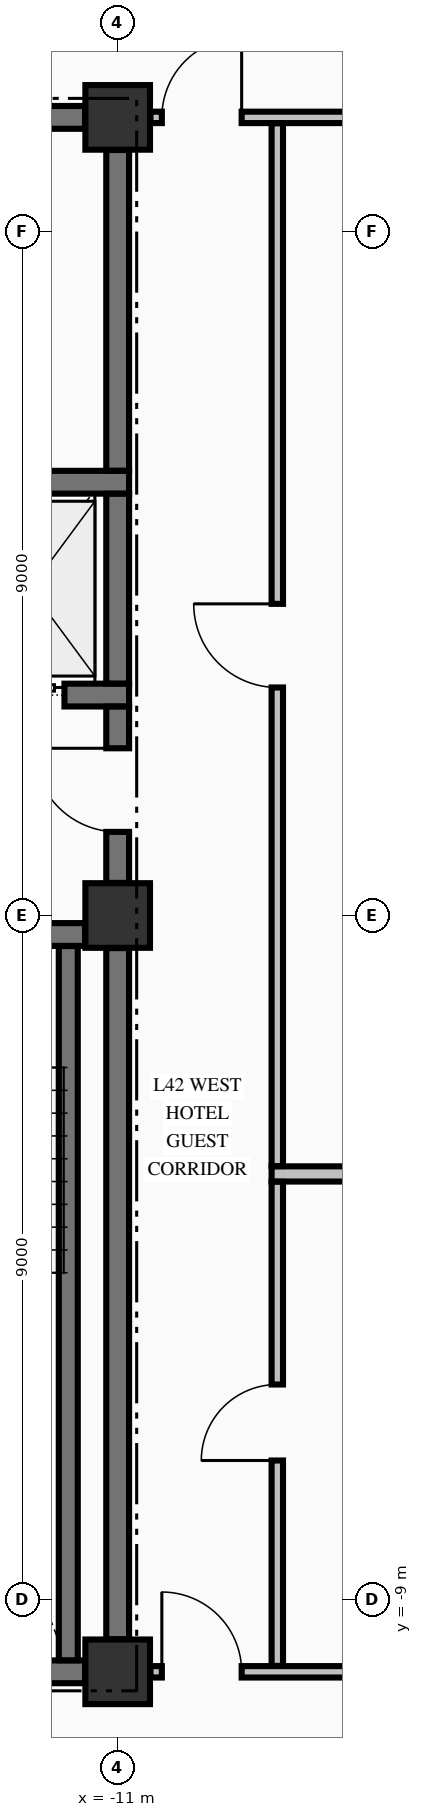
"""IFC4 building model, lengths in metres.
Left out: names, types, materials, properties, quantities, classifications, styles, units other than length and angle.
Written with IfcOpenShell. Run it as: python <this file> out.ifc"""

import sys

from ifc_helpers import new_model, si_unit, direction, frame, frame_2d, origin, origin_2d, place, context, subcontext, project, spatial, rectangle, extrude, element, fill, save


model = new_model("IFC4")
c1 = context("Model", 3, precision=1e-05, world=origin(), true_north=direction((0.0, 1.0)))
c2 = subcontext(c1, "Body", "Model", "MODEL_VIEW")
j1 = project(units=[si_unit("LENGTHUNIT", "METRE"), si_unit("PLANEANGLEUNIT", "RADIAN")], contexts=[c1])
p1 = place(None, origin())
s1 = spatial("IfcSite", under=j1, at=p1, CompositionType="ELEMENT")
p2 = place(p1, origin())
s2 = spatial("IfcBuilding", under=s1, at=p2, CompositionType="ELEMENT")
p3 = place(p2, frame((0.0, 0.0, 166.06)))
s3 = spatial("IfcBuildingStorey", under=s2, at=p3, CompositionType="ELEMENT", Elevation=166.06)
for number, where, z_axis, x_axis in (
    (1, (-11.0, -9.95, -0.25), (0.0, 0.0, 1.0), (1.0, 0.0, 0.0)),
    (2, (-11.0, 0.0, -0.25), (0.0, 0.0, 1.0), (1.0, 0.0, 0.0)),
    (3, (-11.0, 10.5, -0.25), (0.0, 0.0, 1.0), (1.0, 0.0, 0.0)),
):
    element("IfcColumn", number, at=place(p3, frame(where, z_axis=z_axis, x_axis=x_axis)), inside=s3, PredefinedType="COLUMN", context=c2, shape_type="SweptSolid", body=[
        extrude(rectangle(XDim=0.85, YDim=0.85, at=origin_2d()), origin(), (0.0, 0.0, 1.0), 3.4),
    ])
p4 = place(p3, frame((-14.7, -9.95, 0.0), z_axis=(0.0, 0.0, 1.0), x_axis=(1.0, 0.0, 0.0)))
e4 = element("IfcWall", 4, at=p4, inside=s3, PredefinedType="SHEAR", context=c2, shape_type="SweptSolid", body=[
    extrude(rectangle(XDim=3.271, YDim=0.3, at=frame_2d((1.635, 0.0))), origin(), (0.0, 0.0, 1.0), 3.15),
])
p5 = place(p3, frame((-19.571, -0.25, 0.0), z_axis=(0.0, 0.0, 1.0), x_axis=(1.0, 0.0, 0.0)))
e5 = element("IfcWall", 5, at=p5, inside=s3, PredefinedType="SHEAR", context=c2, shape_type="SweptSolid", body=[
    extrude(rectangle(XDim=8.142, YDim=0.3, at=frame_2d((4.071, 0.0))), origin(), (0.0, 0.0, 1.0), 3.15),
])
p6 = place(p5, frame((5.871, 0.0, 0.0)))
e6 = element("IfcOpeningElement", 6, at=p6, cuts=e5, PredefinedType="OPENING", context=c2, shape_type="SweptSolid", body=[
    extrude(rectangle(XDim=1.1, YDim=2.15, at=frame_2d((0.55, 1.075))), frame((0.0, 0.16, 0.0), z_axis=(0.0, -1.0, 0.0), x_axis=(1.0, 0.0, 0.0)), (0.0, 0.0, 1.0), 0.32),
])
p7 = place(p3, frame((-14.875, 2.9, 0.0), z_axis=(0.0, 0.0, 1.0), x_axis=(1.0, 0.0, 0.0)))
e7 = element("IfcWall", 7, at=p7, inside=s3, PredefinedType="SHEAR", context=c2, shape_type="SweptSolid", body=[
    extrude(rectangle(XDim=4.025, YDim=0.3, at=frame_2d((2.012, 0.0))), origin(), (0.0, 0.0, 1.0), 3.15),
])
p8 = place(p7, frame((2.075, 0.0, 0.0)))
e8 = element("IfcOpeningElement", 8, at=p8, cuts=e7, PredefinedType="OPENING", context=c2, shape_type="SweptSolid", body=[
    extrude(rectangle(XDim=1.1, YDim=2.2, at=frame_2d((0.55, 1.1))), frame((0.0, 0.16, 0.0), z_axis=(0.0, -1.0, 0.0), x_axis=(1.0, 0.0, 0.0)), (0.0, 0.0, 1.0), 0.32),
])
p9 = place(p3, frame((-14.875, 5.7, 0.0), z_axis=(0.0, 0.0, 1.0), x_axis=(1.0, 0.0, 0.0)))
e9 = element("IfcWall", 9, at=p9, inside=s3, PredefinedType="SHEAR", context=c2, shape_type="SweptSolid", body=[
    extrude(rectangle(XDim=4.025, YDim=0.3, at=frame_2d((2.012, 0.0))), origin(), (0.0, 0.0, 1.0), 3.15),
])
p10 = place(p3, frame((-14.7, 10.5, 0.0), z_axis=(0.0, 0.0, 1.0), x_axis=(1.0, 0.0, 0.0)))
e10 = element("IfcWall", 10, at=p10, inside=s3, PredefinedType="SHEAR", context=c2, shape_type="SweptSolid", body=[
    extrude(rectangle(XDim=3.271, YDim=0.3, at=frame_2d((1.635, 0.0))), origin(), (0.0, 0.0, 1.0), 3.15),
])
p11 = place(p10, frame((0.775, 0.0, 0.0)))
e11 = element("IfcOpeningElement", 11, at=p11, cuts=e10, PredefinedType="OPENING", context=c2, shape_type="SweptSolid", body=[
    extrude(rectangle(XDim=0.95, YDim=2.15, at=frame_2d((0.475, 1.075))), frame((0.0, 0.16, 0.0), z_axis=(0.0, -1.0, 0.0), x_axis=(1.0, 0.0, 0.0)), (0.0, 0.0, 1.0), 0.32),
])
p12 = place(p3, frame((-10.569, -9.95, 0.0), z_axis=(0.0, 0.0, 1.0), x_axis=(1.0, 0.0, 0.0)))
e12 = element("IfcWall", 12, at=p12, inside=s3, PredefinedType="PARTITIONING", context=c2, shape_type="SweptSolid", body=[
    extrude(rectangle(XDim=21.138, YDim=0.15, at=frame_2d((10.569, 0.0))), origin(), (0.0, 0.0, 1.0), 3.15),
])
p13 = place(p12, frame((0.15, 0.0, 0.0)))
e13 = element("IfcOpeningElement", 13, at=p13, cuts=e12, PredefinedType="OPENING", context=c2, shape_type="SweptSolid", body=[
    extrude(rectangle(XDim=1.05, YDim=2.15, at=frame_2d((0.525, 1.075))), frame((0.0, 0.085, 0.0), z_axis=(0.0, -1.0, 0.0), x_axis=(1.0, 0.0, 0.0)), (0.0, 0.0, 1.0), 0.17),
])
p14 = place(p12, frame((19.938, 0.0, 0.0)))
e14 = element("IfcOpeningElement", 14, at=p14, cuts=e12, PredefinedType="OPENING", context=c2, shape_type="SweptSolid", body=[
    extrude(rectangle(XDim=1.05, YDim=2.15, at=frame_2d((0.525, 1.075))), frame((0.0, 0.085, 0.0), z_axis=(0.0, -1.0, 0.0), x_axis=(1.0, 0.0, 0.0)), (0.0, 0.0, 1.0), 0.17),
])
p15 = place(p12, frame((13.944, 0.0, 0.0)))
e15 = element("IfcOpeningElement", 15, at=p15, cuts=e12, PredefinedType="OPENING", context=c2, shape_type="SweptSolid", body=[
    extrude(rectangle(XDim=0.95, YDim=2.15, at=frame_2d((0.475, 1.075))), frame((0.0, 0.085, 0.0), z_axis=(0.0, -1.0, 0.0), x_axis=(1.0, 0.0, 0.0)), (0.0, 0.0, 1.0), 0.17),
])
p16 = place(p3, frame((-8.975, -3.4, 0.0), z_axis=(0.0, 0.0, 1.0), x_axis=(1.0, 0.0, 0.0)))
e16 = element("IfcWall", 16, at=p16, inside=s3, PredefinedType="PARTITIONING", context=c2, shape_type="SweptSolid", body=[
    extrude(rectangle(XDim=10.875, YDim=0.2, at=frame_2d((5.438, 0.0))), origin(), (0.0, 0.0, 1.0), 3.15),
])
p17 = place(p3, frame((-10.569, 10.5, 0.0), z_axis=(0.0, 0.0, 1.0), x_axis=(1.0, 0.0, 0.0)))
e17 = element("IfcWall", 17, at=p17, inside=s3, PredefinedType="PARTITIONING", context=c2, shape_type="SweptSolid", body=[
    extrude(rectangle(XDim=21.138, YDim=0.15, at=frame_2d((10.569, 0.0))), origin(), (0.0, 0.0, 1.0), 3.15),
])
p18 = place(p17, frame((0.15, 0.0, 0.0)))
e18 = element("IfcOpeningElement", 18, at=p18, cuts=e17, PredefinedType="OPENING", context=c2, shape_type="SweptSolid", body=[
    extrude(rectangle(XDim=1.05, YDim=2.15, at=frame_2d((0.525, 1.075))), frame((0.0, 0.085, 0.0), z_axis=(0.0, -1.0, 0.0), x_axis=(1.0, 0.0, 0.0)), (0.0, 0.0, 1.0), 0.17),
])
p19 = place(p17, frame((19.938, 0.0, 0.0)))
e19 = element("IfcOpeningElement", 19, at=p19, cuts=e17, PredefinedType="OPENING", context=c2, shape_type="SweptSolid", body=[
    extrude(rectangle(XDim=1.05, YDim=2.15, at=frame_2d((0.525, 1.075))), frame((0.0, 0.085, 0.0), z_axis=(0.0, -1.0, 0.0), x_axis=(1.0, 0.0, 0.0)), (0.0, 0.0, 1.0), 0.17),
])
p20 = place(p3, frame((-11.65, -9.798, 0.0), z_axis=(0.0, 0.0, 1.0), x_axis=(0.0, 1.0, 0.0)))
e20 = element("IfcWall", 20, at=p20, inside=s3, PredefinedType="SOLIDWALL", context=c2, shape_type="SweptSolid", body=[
    extrude(rectangle(XDim=9.396, YDim=0.25, at=frame_2d((4.698, 0.0))), origin(), (0.0, 0.0, 1.0), 3.15),
])
p21 = place(p3, frame((-11.0, -9.521, 0.0), z_axis=(0.0, 0.0, 1.0), x_axis=(0.0, 1.0, 0.0)))
e21 = element("IfcWall", 21, at=p21, inside=s3, PredefinedType="SHEAR", context=c2, shape_type="SweptSolid", body=[
    extrude(rectangle(XDim=9.092, YDim=0.3, at=frame_2d((4.546, 0.0))), origin(), (0.0, 0.0, 1.0), 3.15),
])
p22 = place(p3, frame((-11.0, 0.429, 0.0), z_axis=(0.0, 0.0, 1.0), x_axis=(0.0, 1.0, 0.0)))
e22 = element("IfcWall", 22, at=p22, inside=s3, PredefinedType="SHEAR", context=c2, shape_type="SweptSolid", body=[
    extrude(rectangle(XDim=2.319, YDim=0.3, at=frame_2d((1.16, 0.0))), origin(), (0.0, 0.0, 1.0), 3.15),
])
p23 = place(p22, frame((0.671, 0.0, 0.0)))
e23 = element("IfcOpeningElement", 23, at=p23, cuts=e22, PredefinedType="OPENING", context=c2, shape_type="SweptSolid", body=[
    extrude(rectangle(XDim=1.1, YDim=2.15, at=frame_2d((0.55, 1.075))), frame((0.0, 0.16, 0.0), z_axis=(0.0, -1.0, 0.0), x_axis=(1.0, 0.0, 0.0)), (0.0, 0.0, 1.0), 0.32),
])
p24 = place(p3, frame((-11.0, 3.052, 0.0), z_axis=(0.0, 0.0, 1.0), x_axis=(0.0, 1.0, 0.0)))
e24 = element("IfcWall", 24, at=p24, inside=s3, PredefinedType="SHEAR", context=c2, shape_type="SweptSolid", body=[
    extrude(rectangle(XDim=2.496, YDim=0.3, at=frame_2d((1.248, 0.0))), origin(), (0.0, 0.0, 1.0), 3.15),
])
p25 = place(p3, frame((-11.0, 5.852, 0.0), z_axis=(0.0, 0.0, 1.0), x_axis=(0.0, 1.0, 0.0)))
e25 = element("IfcWall", 25, at=p25, inside=s3, PredefinedType="SHEAR", context=c2, shape_type="SweptSolid", body=[
    extrude(rectangle(XDim=4.219, YDim=0.3, at=frame_2d((2.109, 0.0))), origin(), (0.0, 0.0, 1.0), 3.15),
])
p26 = place(p3, frame((-8.9, -9.872, 0.0), z_axis=(0.0, 0.0, 1.0), x_axis=(0.0, 1.0, 0.0)))
e26 = element("IfcWall", 26, at=p26, inside=s3, PredefinedType="PARTITIONING", context=c2, shape_type="SweptSolid", body=[
    extrude(rectangle(XDim=6.369, YDim=0.15, at=frame_2d((3.185, 0.0))), origin(), (0.0, 0.0, 1.0), 3.15),
])
p27 = place(p26, frame((2.702, 0.0, 0.0)))
e27 = element("IfcOpeningElement", 27, at=p27, cuts=e26, PredefinedType="OPENING", context=c2, shape_type="SweptSolid", body=[
    extrude(rectangle(XDim=1.0, YDim=2.15, at=frame_2d((0.5, 1.075))), frame((0.0, 0.085, 0.0), z_axis=(0.0, -1.0, 0.0), x_axis=(1.0, 0.0, 0.0)), (0.0, 0.0, 1.0), 0.17),
])
p28 = place(p3, frame((-8.9, -3.297, 0.0), z_axis=(0.0, 0.0, 1.0), x_axis=(0.0, 1.0, 0.0)))
e28 = element("IfcWall", 28, at=p28, inside=s3, PredefinedType="PARTITIONING", context=c2, shape_type="SweptSolid", body=[
    extrude(rectangle(XDim=13.719, YDim=0.15, at=frame_2d((6.86, 0.0))), origin(), (0.0, 0.0, 1.0), 3.15),
])
p29 = place(p28, frame((6.297, 0.0, 0.0)))
e29 = element("IfcOpeningElement", 29, at=p29, cuts=e28, PredefinedType="OPENING", context=c2, shape_type="SweptSolid", body=[
    extrude(rectangle(XDim=1.1, YDim=2.15, at=frame_2d((0.55, 1.075))), frame((0.0, 0.085, 0.0), z_axis=(0.0, -1.0, 0.0), x_axis=(1.0, 0.0, 0.0)), (0.0, 0.0, 1.0), 0.17),
])
p30 = place(p23, origin())
e30 = element("IfcDoor", 30, at=p30, inside=s3, OperationType="SINGLE_SWING_RIGHT", PredefinedType="DOOR", context=c2, shape_type="SweptSolid", body=[
    extrude(rectangle(XDim=1.1, YDim=2.15, at=frame_2d((0.55, 1.075))), frame((0.0, 0.025, 0.0), z_axis=(0.0, -1.0, 0.0), x_axis=(1.0, 0.0, 0.0)), (0.0, 0.0, 1.0), 0.05),
])
fill(e23, e30)
p31 = place(p8, origin())
e31 = element("IfcDoor", 31, at=p31, inside=s3, OperationType="SLIDING_TO_LEFT", PredefinedType="DOOR", context=c2, shape_type="SweptSolid", body=[
    extrude(rectangle(XDim=1.1, YDim=2.2, at=frame_2d((0.55, 1.1))), frame((0.0, 0.025, 0.0), z_axis=(0.0, -1.0, 0.0), x_axis=(1.0, 0.0, 0.0)), (0.0, 0.0, 1.0), 0.05),
])
fill(e8, e31)
p32 = place(p18, origin())
e32 = element("IfcDoor", 32, at=p32, inside=s3, OperationType="SINGLE_SWING_RIGHT", PredefinedType="DOOR", context=c2, shape_type="SweptSolid", body=[
    extrude(rectangle(XDim=1.05, YDim=2.15, at=frame_2d((0.525, 1.075))), frame((0.0, 0.025, 0.0), z_axis=(0.0, -1.0, 0.0), x_axis=(1.0, 0.0, 0.0)), (0.0, 0.0, 1.0), 0.05),
])
fill(e18, e32)
p33 = place(p13, origin())
e33 = element("IfcDoor", 33, at=p33, inside=s3, OperationType="SINGLE_SWING_LEFT", PredefinedType="DOOR", context=c2, shape_type="SweptSolid", body=[
    extrude(rectangle(XDim=1.05, YDim=2.15, at=frame_2d((0.525, 1.075))), frame((0.0, 0.025, 0.0), z_axis=(0.0, -1.0, 0.0), x_axis=(1.0, 0.0, 0.0)), (0.0, 0.0, 1.0), 0.05),
])
fill(e13, e33)
p34 = place(p29, origin())
e34 = element("IfcDoor", 34, at=p34, inside=s3, OperationType="SINGLE_SWING_RIGHT", PredefinedType="DOOR", context=c2, shape_type="SweptSolid", body=[
    extrude(rectangle(XDim=1.1, YDim=2.15, at=frame_2d((0.55, 1.075))), frame((0.0, 0.025, 0.0), z_axis=(0.0, -1.0, 0.0), x_axis=(1.0, 0.0, 0.0)), (0.0, 0.0, 1.0), 0.05),
])
fill(e29, e34)
p35 = place(p27, origin())
e35 = element("IfcDoor", 35, at=p35, inside=s3, OperationType="SINGLE_SWING_LEFT", PredefinedType="DOOR", context=c2, shape_type="SweptSolid", body=[
    extrude(rectangle(XDim=1.0, YDim=2.15, at=frame_2d((0.5, 1.075))), frame((0.0, 0.025, 0.0), z_axis=(0.0, -1.0, 0.0), x_axis=(1.0, 0.0, 0.0)), (0.0, 0.0, 1.0), 0.05),
])
fill(e27, e35)
save(model, sys.argv[1])
